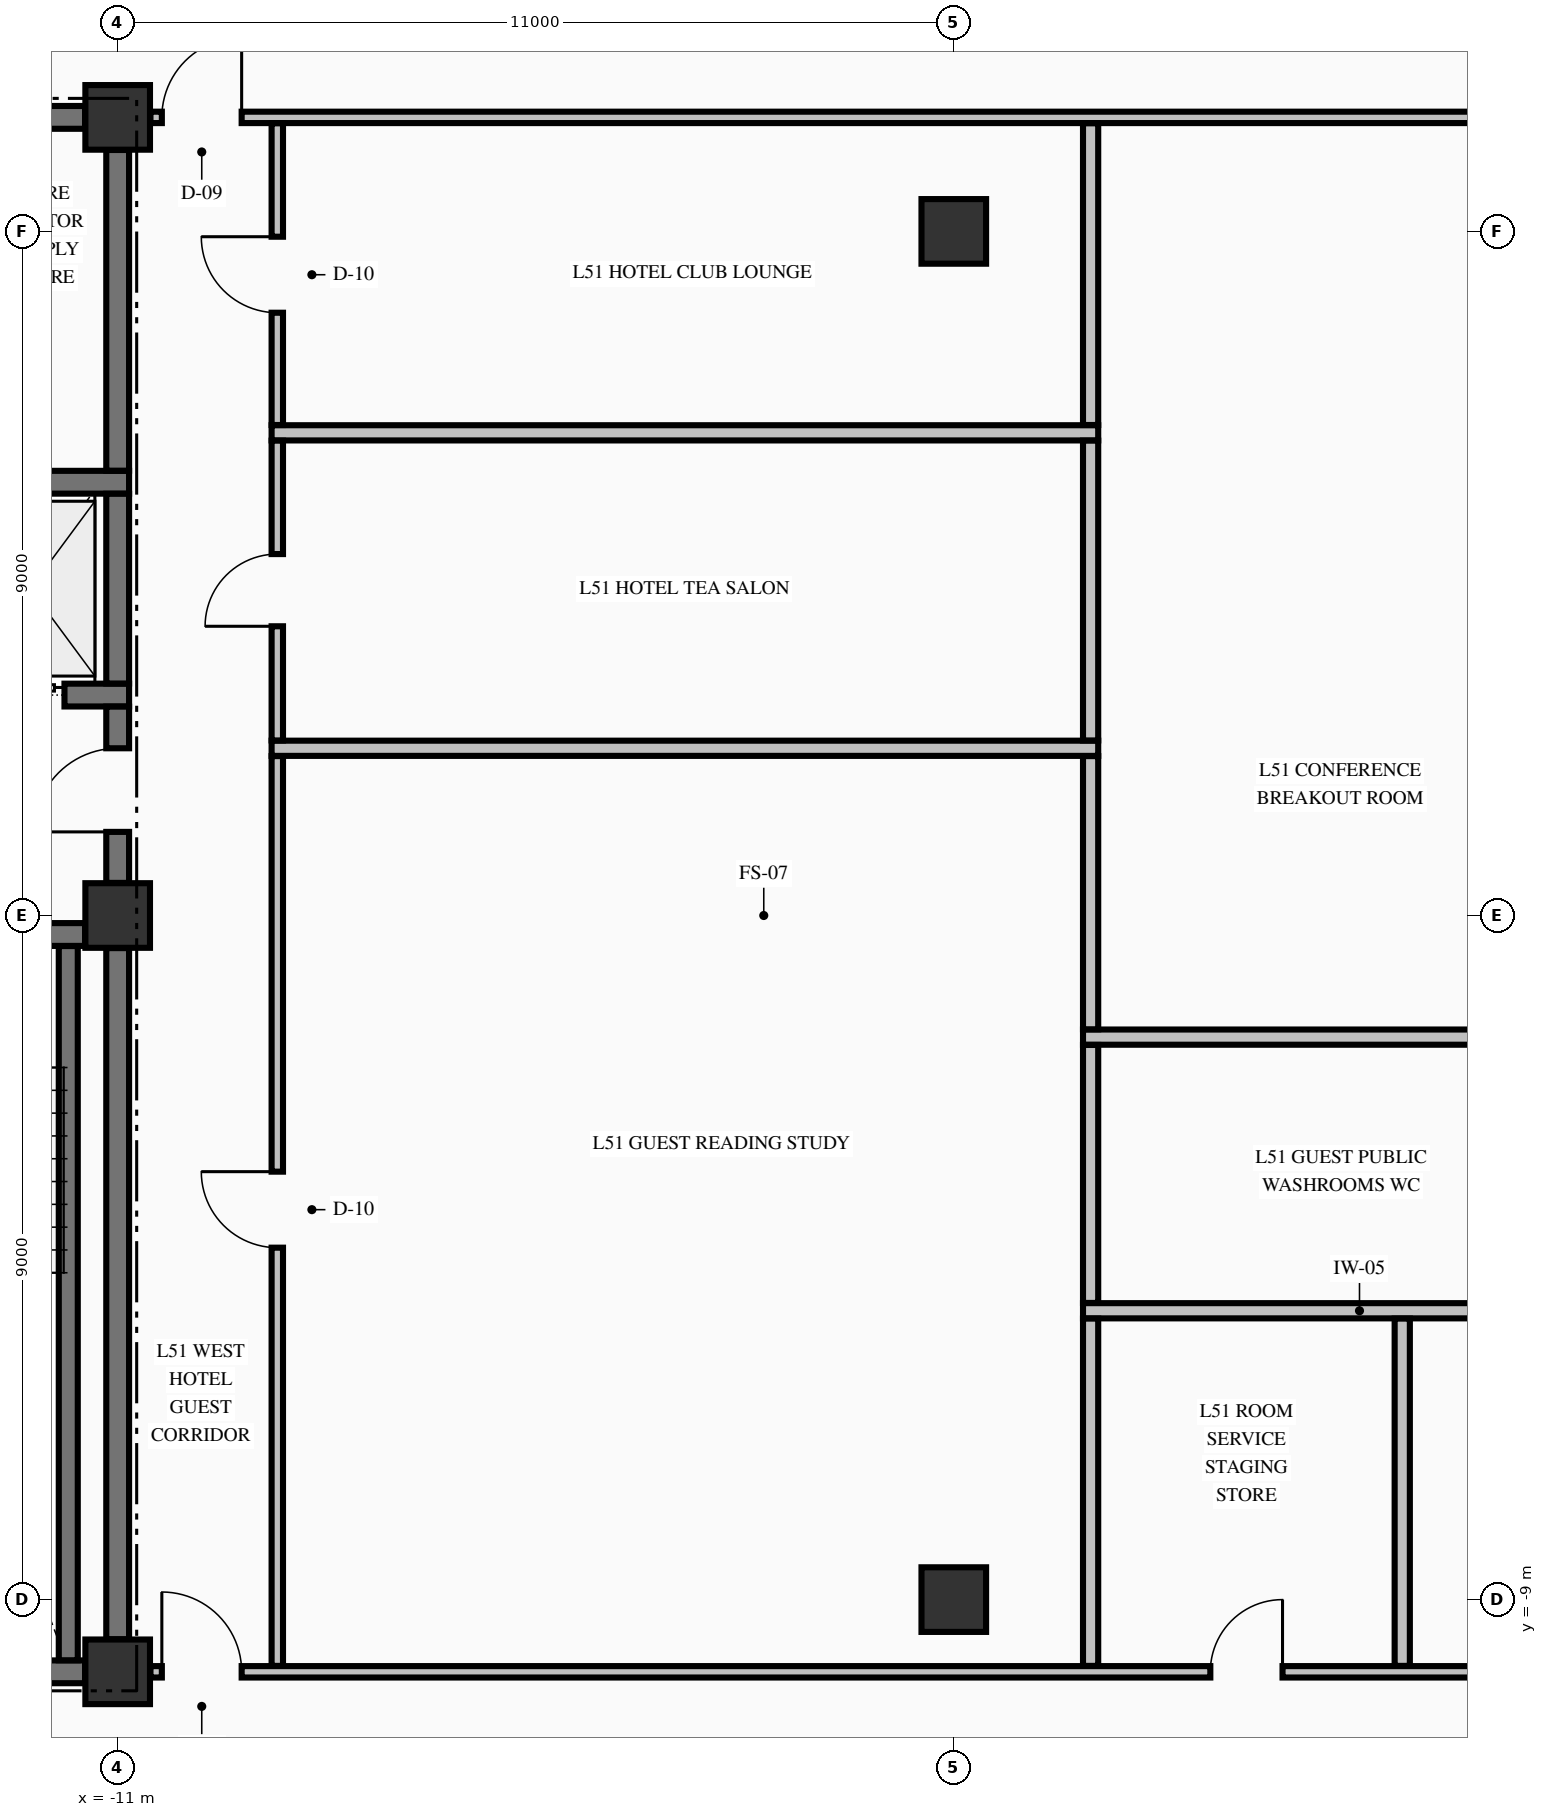
"""IFC4 building model, lengths in metres.
Left out: names, types, materials, properties, quantities, classifications, styles, units other than length and angle.
Written with IfcOpenShell. Run it as: python <this file> out.ifc"""

import sys

from ifc_helpers import new_model, si_unit, direction, frame, frame_2d, origin, origin_2d, place, context, subcontext, project, spatial, rectangle, extrude, element, fill, save


model = new_model("IFC4")
c1 = context("Model", 3, precision=1e-05, world=origin(), true_north=direction((0.0, 1.0)))
c2 = subcontext(c1, "Body", "Model", "MODEL_VIEW")
j1 = project(units=[si_unit("LENGTHUNIT", "METRE"), si_unit("PLANEANGLEUNIT", "RADIAN")], contexts=[c1])
p1 = place(None, origin())
s1 = spatial("IfcSite", under=j1, at=p1, CompositionType="ELEMENT")
p2 = place(p1, origin())
s2 = spatial("IfcBuilding", under=s1, at=p2, CompositionType="ELEMENT")
p3 = place(p2, frame((0.0, 0.0, 198.26)))
s3 = spatial("IfcBuildingStorey", under=s2, at=p3, CompositionType="ELEMENT", Elevation=198.26)
for number, where, z_axis, x_axis in (
    (1, (-11.0, -9.95, -0.25), (0.0, 0.0, 1.0), (1.0, 0.0, 0.0)),
    (2, (-11.0, 0.0, -0.25), (0.0, 0.0, 1.0), (1.0, 0.0, 0.0)),
    (3, (-11.0, 10.5, -0.25), (0.0, 0.0, 1.0), (1.0, 0.0, 0.0)),
    (4, (0.0, -9.0, -0.25), (0.0, 0.0, 1.0), (1.0, 0.0, 0.0)),
    (5, (0.0, 9.0, -0.25), (0.0, 0.0, 1.0), (1.0, 0.0, 0.0)),
):
    element("IfcColumn", number, at=place(p3, frame(where, z_axis=z_axis, x_axis=x_axis)), inside=s3, PredefinedType="COLUMN", context=c2, shape_type="SweptSolid", body=[
        extrude(rectangle(XDim=0.85, YDim=0.85, at=origin_2d()), origin(), (0.0, 0.0, 1.0), 3.4),
    ])
p4 = place(p3, frame((-14.7, -9.95, 0.0), z_axis=(0.0, 0.0, 1.0), x_axis=(1.0, 0.0, 0.0)))
e6 = element("IfcWall", 6, at=p4, inside=s3, PredefinedType="SHEAR", context=c2, shape_type="SweptSolid", body=[
    extrude(rectangle(XDim=3.271, YDim=0.3, at=frame_2d((1.635, 0.0))), origin(), (0.0, 0.0, 1.0), 3.15),
])
p5 = place(p3, frame((-19.571, -0.25, 0.0), z_axis=(0.0, 0.0, 1.0), x_axis=(1.0, 0.0, 0.0)))
e7 = element("IfcWall", 7, at=p5, inside=s3, PredefinedType="SHEAR", context=c2, shape_type="SweptSolid", body=[
    extrude(rectangle(XDim=8.142, YDim=0.3, at=frame_2d((4.071, 0.0))), origin(), (0.0, 0.0, 1.0), 3.15),
])
p6 = place(p5, frame((5.871, 0.0, 0.0)))
e8 = element("IfcOpeningElement", 8, at=p6, cuts=e7, PredefinedType="OPENING", context=c2, shape_type="SweptSolid", body=[
    extrude(rectangle(XDim=1.1, YDim=2.15, at=frame_2d((0.55, 1.075))), frame((0.0, 0.16, 0.0), z_axis=(0.0, -1.0, 0.0), x_axis=(1.0, 0.0, 0.0)), (0.0, 0.0, 1.0), 0.32),
])
p7 = place(p3, frame((-14.875, 2.9, 0.0), z_axis=(0.0, 0.0, 1.0), x_axis=(1.0, 0.0, 0.0)))
e9 = element("IfcWall", 9, at=p7, inside=s3, PredefinedType="SHEAR", context=c2, shape_type="SweptSolid", body=[
    extrude(rectangle(XDim=4.025, YDim=0.3, at=frame_2d((2.012, 0.0))), origin(), (0.0, 0.0, 1.0), 3.15),
])
p8 = place(p7, frame((2.075, 0.0, 0.0)))
e10 = element("IfcOpeningElement", 10, at=p8, cuts=e9, PredefinedType="OPENING", context=c2, shape_type="SweptSolid", body=[
    extrude(rectangle(XDim=1.1, YDim=2.2, at=frame_2d((0.55, 1.1))), frame((0.0, 0.16, 0.0), z_axis=(0.0, -1.0, 0.0), x_axis=(1.0, 0.0, 0.0)), (0.0, 0.0, 1.0), 0.32),
])
p9 = place(p3, frame((-14.875, 5.7, 0.0), z_axis=(0.0, 0.0, 1.0), x_axis=(1.0, 0.0, 0.0)))
e11 = element("IfcWall", 11, at=p9, inside=s3, PredefinedType="SHEAR", context=c2, shape_type="SweptSolid", body=[
    extrude(rectangle(XDim=4.025, YDim=0.3, at=frame_2d((2.012, 0.0))), origin(), (0.0, 0.0, 1.0), 3.15),
])
p10 = place(p3, frame((-14.7, 10.5, 0.0), z_axis=(0.0, 0.0, 1.0), x_axis=(1.0, 0.0, 0.0)))
e12 = element("IfcWall", 12, at=p10, inside=s3, PredefinedType="SHEAR", context=c2, shape_type="SweptSolid", body=[
    extrude(rectangle(XDim=3.271, YDim=0.3, at=frame_2d((1.635, 0.0))), origin(), (0.0, 0.0, 1.0), 3.15),
])
p11 = place(p10, frame((0.245, 0.0, 0.0)))
e13 = element("IfcOpeningElement", 13, at=p11, cuts=e12, PredefinedType="OPENING", context=c2, shape_type="SweptSolid", body=[
    extrude(rectangle(XDim=0.95, YDim=2.15, at=frame_2d((0.475, 1.075))), frame((0.0, 0.16, 0.0), z_axis=(0.0, -1.0, 0.0), x_axis=(1.0, 0.0, 0.0)), (0.0, 0.0, 1.0), 0.32),
])
p12 = place(p3, frame((-10.569, -9.95, 0.0), z_axis=(0.0, 0.0, 1.0), x_axis=(1.0, 0.0, 0.0)))
e14 = element("IfcWall", 14, at=p12, inside=s3, PredefinedType="PARTITIONING", context=c2, shape_type="SweptSolid", body=[
    extrude(rectangle(XDim=21.138, YDim=0.15, at=frame_2d((10.569, 0.0))), origin(), (0.0, 0.0, 1.0), 3.15),
])
p13 = place(p12, frame((0.15, 0.0, 0.0)))
e15 = element("IfcOpeningElement", 15, at=p13, cuts=e14, PredefinedType="OPENING", context=c2, shape_type="SweptSolid", body=[
    extrude(rectangle(XDim=1.05, YDim=2.15, at=frame_2d((0.525, 1.075))), frame((0.0, 0.085, 0.0), z_axis=(0.0, -1.0, 0.0), x_axis=(1.0, 0.0, 0.0)), (0.0, 0.0, 1.0), 0.17),
])
p14 = place(p12, frame((19.938, 0.0, 0.0)))
e16 = element("IfcOpeningElement", 16, at=p14, cuts=e14, PredefinedType="OPENING", context=c2, shape_type="SweptSolid", body=[
    extrude(rectangle(XDim=1.05, YDim=2.15, at=frame_2d((0.525, 1.075))), frame((0.0, 0.085, 0.0), z_axis=(0.0, -1.0, 0.0), x_axis=(1.0, 0.0, 0.0)), (0.0, 0.0, 1.0), 0.17),
])
p15 = place(p12, frame((13.944, 0.0, 0.0)))
e17 = element("IfcOpeningElement", 17, at=p15, cuts=e14, PredefinedType="OPENING", context=c2, shape_type="SweptSolid", body=[
    extrude(rectangle(XDim=0.95, YDim=2.15, at=frame_2d((0.475, 1.075))), frame((0.0, 0.085, 0.0), z_axis=(0.0, -1.0, 0.0), x_axis=(1.0, 0.0, 0.0)), (0.0, 0.0, 1.0), 0.17),
])
for number, where, z_axis, x_axis in (
    (18, (1.7, -5.2, 0.0), (0.0, 0.0, 1.0), (1.0, 0.0, 0.0)),
    (19, (1.7, -1.6, 0.0), (0.0, 0.0, 1.0), (1.0, 0.0, 0.0)),
):
    element("IfcWall", number, at=place(p3, frame(where, z_axis=z_axis, x_axis=x_axis)), inside=s3, PredefinedType="PARTITIONING", context=c2, shape_type="SweptSolid", body=[
        extrude(rectangle(XDim=7.275, YDim=0.2, at=frame_2d((3.638, 0.0))), origin(), (0.0, 0.0, 1.0), 3.15),
    ])
for number, where, z_axis, x_axis in (
    (20, (-8.975, 2.2, 0.0), (0.0, 0.0, 1.0), (1.0, 0.0, 0.0)),
    (21, (-8.975, 6.35, 0.0), (0.0, 0.0, 1.0), (1.0, 0.0, 0.0)),
):
    element("IfcWall", number, at=place(p3, frame(where, z_axis=z_axis, x_axis=x_axis)), inside=s3, PredefinedType="PARTITIONING", context=c2, shape_type="SweptSolid", body=[
        extrude(rectangle(XDim=10.875, YDim=0.2, at=frame_2d((5.438, 0.0))), origin(), (0.0, 0.0, 1.0), 3.15),
    ])
p16 = place(p3, frame((-10.569, 10.5, 0.0), z_axis=(0.0, 0.0, 1.0), x_axis=(1.0, 0.0, 0.0)))
e22 = element("IfcWall", 22, at=p16, inside=s3, PredefinedType="PARTITIONING", context=c2, shape_type="SweptSolid", body=[
    extrude(rectangle(XDim=21.138, YDim=0.15, at=frame_2d((10.569, 0.0))), origin(), (0.0, 0.0, 1.0), 3.15),
])
p17 = place(p16, frame((0.15, 0.0, 0.0)))
e23 = element("IfcOpeningElement", 23, at=p17, cuts=e22, PredefinedType="OPENING", context=c2, shape_type="SweptSolid", body=[
    extrude(rectangle(XDim=1.05, YDim=2.15, at=frame_2d((0.525, 1.075))), frame((0.0, 0.085, 0.0), z_axis=(0.0, -1.0, 0.0), x_axis=(1.0, 0.0, 0.0)), (0.0, 0.0, 1.0), 0.17),
])
p18 = place(p16, frame((19.938, 0.0, 0.0)))
e24 = element("IfcOpeningElement", 24, at=p18, cuts=e22, PredefinedType="OPENING", context=c2, shape_type="SweptSolid", body=[
    extrude(rectangle(XDim=1.05, YDim=2.15, at=frame_2d((0.525, 1.075))), frame((0.0, 0.085, 0.0), z_axis=(0.0, -1.0, 0.0), x_axis=(1.0, 0.0, 0.0)), (0.0, 0.0, 1.0), 0.17),
])
p19 = place(p3, frame((-11.65, -9.798, 0.0), z_axis=(0.0, 0.0, 1.0), x_axis=(0.0, 1.0, 0.0)))
e25 = element("IfcWall", 25, at=p19, inside=s3, PredefinedType="SOLIDWALL", context=c2, shape_type="SweptSolid", body=[
    extrude(rectangle(XDim=9.396, YDim=0.25, at=frame_2d((4.698, 0.0))), origin(), (0.0, 0.0, 1.0), 3.15),
])
p20 = place(p3, frame((-11.0, -9.521, 0.0), z_axis=(0.0, 0.0, 1.0), x_axis=(0.0, 1.0, 0.0)))
e26 = element("IfcWall", 26, at=p20, inside=s3, PredefinedType="SHEAR", context=c2, shape_type="SweptSolid", body=[
    extrude(rectangle(XDim=9.092, YDim=0.3, at=frame_2d((4.546, 0.0))), origin(), (0.0, 0.0, 1.0), 3.15),
])
p21 = place(p3, frame((-11.0, 0.429, 0.0), z_axis=(0.0, 0.0, 1.0), x_axis=(0.0, 1.0, 0.0)))
e27 = element("IfcWall", 27, at=p21, inside=s3, PredefinedType="SHEAR", context=c2, shape_type="SweptSolid", body=[
    extrude(rectangle(XDim=2.319, YDim=0.3, at=frame_2d((1.16, 0.0))), origin(), (0.0, 0.0, 1.0), 3.15),
])
p22 = place(p21, frame((0.671, 0.0, 0.0)))
e28 = element("IfcOpeningElement", 28, at=p22, cuts=e27, PredefinedType="OPENING", context=c2, shape_type="SweptSolid", body=[
    extrude(rectangle(XDim=1.1, YDim=2.15, at=frame_2d((0.55, 1.075))), frame((0.0, 0.16, 0.0), z_axis=(0.0, -1.0, 0.0), x_axis=(1.0, 0.0, 0.0)), (0.0, 0.0, 1.0), 0.32),
])
p23 = place(p3, frame((-11.0, 3.052, 0.0), z_axis=(0.0, 0.0, 1.0), x_axis=(0.0, 1.0, 0.0)))
e29 = element("IfcWall", 29, at=p23, inside=s3, PredefinedType="SHEAR", context=c2, shape_type="SweptSolid", body=[
    extrude(rectangle(XDim=2.496, YDim=0.3, at=frame_2d((1.248, 0.0))), origin(), (0.0, 0.0, 1.0), 3.15),
])
p24 = place(p3, frame((-11.0, 5.852, 0.0), z_axis=(0.0, 0.0, 1.0), x_axis=(0.0, 1.0, 0.0)))
e30 = element("IfcWall", 30, at=p24, inside=s3, PredefinedType="SHEAR", context=c2, shape_type="SweptSolid", body=[
    extrude(rectangle(XDim=4.219, YDim=0.3, at=frame_2d((2.109, 0.0))), origin(), (0.0, 0.0, 1.0), 3.15),
])
p25 = place(p3, frame((-8.9, -9.872, 0.0), z_axis=(0.0, 0.0, 1.0), x_axis=(0.0, 1.0, 0.0)))
e31 = element("IfcWall", 31, at=p25, inside=s3, PredefinedType="PARTITIONING", context=c2, shape_type="SweptSolid", body=[
    extrude(rectangle(XDim=11.969, YDim=0.15, at=frame_2d((5.984, 0.0))), origin(), (0.0, 0.0, 1.0), 3.15),
])
p26 = place(p25, frame((5.502, 0.0, 0.0)))
e32 = element("IfcOpeningElement", 32, at=p26, cuts=e31, PredefinedType="OPENING", context=c2, shape_type="SweptSolid", body=[
    extrude(rectangle(XDim=1.0, YDim=2.15, at=frame_2d((0.5, 1.075))), frame((0.0, 0.085, 0.0), z_axis=(0.0, -1.0, 0.0), x_axis=(1.0, 0.0, 0.0)), (0.0, 0.0, 1.0), 0.17),
])
p27 = place(p3, frame((-8.9, 2.303, 0.0), z_axis=(0.0, 0.0, 1.0), x_axis=(0.0, 1.0, 0.0)))
e33 = element("IfcWall", 33, at=p27, inside=s3, PredefinedType="PARTITIONING", context=c2, shape_type="SweptSolid", body=[
    extrude(rectangle(XDim=3.944, YDim=0.15, at=frame_2d((1.972, 0.0))), origin(), (0.0, 0.0, 1.0), 3.15),
])
p28 = place(p27, frame((1.502, 0.0, 0.0)))
e34 = element("IfcOpeningElement", 34, at=p28, cuts=e33, PredefinedType="OPENING", context=c2, shape_type="SweptSolid", body=[
    extrude(rectangle(XDim=0.95, YDim=2.15, at=frame_2d((0.475, 1.075))), frame((0.0, 0.085, 0.0), z_axis=(0.0, -1.0, 0.0), x_axis=(1.0, 0.0, 0.0)), (0.0, 0.0, 1.0), 0.17),
])
p29 = place(p3, frame((-8.9, 6.453, 0.0), z_axis=(0.0, 0.0, 1.0), x_axis=(0.0, 1.0, 0.0)))
e35 = element("IfcWall", 35, at=p29, inside=s3, PredefinedType="PARTITIONING", context=c2, shape_type="SweptSolid", body=[
    extrude(rectangle(XDim=3.969, YDim=0.15, at=frame_2d((1.985, 0.0))), origin(), (0.0, 0.0, 1.0), 3.15),
])
p30 = place(p29, frame((1.477, 0.0, 0.0)))
e36 = element("IfcOpeningElement", 36, at=p30, cuts=e35, PredefinedType="OPENING", context=c2, shape_type="SweptSolid", body=[
    extrude(rectangle(XDim=1.0, YDim=2.15, at=frame_2d((0.5, 1.075))), frame((0.0, 0.085, 0.0), z_axis=(0.0, -1.0, 0.0), x_axis=(1.0, 0.0, 0.0)), (0.0, 0.0, 1.0), 0.17),
])
p31 = place(p3, frame((1.8, -9.872, 0.0), z_axis=(0.0, 0.0, 1.0), x_axis=(0.0, 1.0, 0.0)))
e37 = element("IfcWall", 37, at=p31, inside=s3, PredefinedType="PARTITIONING", context=c2, shape_type="SweptSolid", body=[
    extrude(rectangle(XDim=4.569, YDim=0.2, at=frame_2d((2.285, 0.0))), origin(), (0.0, 0.0, 1.0), 3.15),
])
p32 = place(p3, frame((1.8, -5.097, 0.0), z_axis=(0.0, 0.0, 1.0), x_axis=(0.0, 1.0, 0.0)))
e38 = element("IfcWall", 38, at=p32, inside=s3, PredefinedType="PARTITIONING", context=c2, shape_type="SweptSolid", body=[
    extrude(rectangle(XDim=3.394, YDim=0.2, at=frame_2d((1.697, 0.0))), origin(), (0.0, 0.0, 1.0), 3.15),
])
p33 = place(p3, frame((1.8, -1.497, 0.0), z_axis=(0.0, 0.0, 1.0), x_axis=(0.0, 1.0, 0.0)))
e39 = element("IfcWall", 39, at=p33, inside=s3, PredefinedType="PARTITIONING", context=c2, shape_type="SweptSolid", body=[
    extrude(rectangle(XDim=3.594, YDim=0.2, at=frame_2d((1.797, 0.0))), origin(), (0.0, 0.0, 1.0), 3.15),
])
p34 = place(p3, frame((1.8, 2.303, 0.0), z_axis=(0.0, 0.0, 1.0), x_axis=(0.0, 1.0, 0.0)))
e40 = element("IfcWall", 40, at=p34, inside=s3, PredefinedType="PARTITIONING", context=c2, shape_type="SweptSolid", body=[
    extrude(rectangle(XDim=3.944, YDim=0.2, at=frame_2d((1.972, 0.0))), origin(), (0.0, 0.0, 1.0), 3.15),
])
p35 = place(p3, frame((1.8, 6.453, 0.0), z_axis=(0.0, 0.0, 1.0), x_axis=(0.0, 1.0, 0.0)))
e41 = element("IfcWall", 41, at=p35, inside=s3, PredefinedType="PARTITIONING", context=c2, shape_type="SweptSolid", body=[
    extrude(rectangle(XDim=3.969, YDim=0.2, at=frame_2d((1.985, 0.0))), origin(), (0.0, 0.0, 1.0), 3.15),
])
p36 = place(p3, frame((5.9, -9.872, 0.0), z_axis=(0.0, 0.0, 1.0), x_axis=(0.0, 1.0, 0.0)))
e42 = element("IfcWall", 42, at=p36, inside=s3, PredefinedType="PARTITIONING", context=c2, shape_type="SweptSolid", body=[
    extrude(rectangle(XDim=4.569, YDim=0.2, at=frame_2d((2.285, 0.0))), origin(), (0.0, 0.0, 1.0), 3.15),
])
p37 = place(p22, origin())
e43 = element("IfcDoor", 43, at=p37, inside=s3, OperationType="SINGLE_SWING_LEFT", PredefinedType="DOOR", context=c2, shape_type="SweptSolid", body=[
    extrude(rectangle(XDim=1.1, YDim=2.15, at=frame_2d((0.55, 1.075))), frame((0.0, 0.025, 0.0), z_axis=(0.0, -1.0, 0.0), x_axis=(1.0, 0.0, 0.0)), (0.0, 0.0, 1.0), 0.05),
])
fill(e28, e43)
p38 = place(p8, origin())
e44 = element("IfcDoor", 44, at=p38, inside=s3, OperationType="SLIDING_TO_LEFT", PredefinedType="DOOR", context=c2, shape_type="SweptSolid", body=[
    extrude(rectangle(XDim=1.1, YDim=2.2, at=frame_2d((0.55, 1.1))), frame((0.0, 0.025, 0.0), z_axis=(0.0, -1.0, 0.0), x_axis=(1.0, 0.0, 0.0)), (0.0, 0.0, 1.0), 0.05),
])
fill(e10, e44)
p39 = place(p17, origin())
e45 = element("IfcDoor", 45, at=p39, inside=s3, OperationType="SINGLE_SWING_RIGHT", PredefinedType="DOOR", context=c2, shape_type="SweptSolid", body=[
    extrude(rectangle(XDim=1.05, YDim=2.15, at=frame_2d((0.525, 1.075))), frame((0.0, 0.025, 0.0), z_axis=(0.0, -1.0, 0.0), x_axis=(1.0, 0.0, 0.0)), (0.0, 0.0, 1.0), 0.05),
])
fill(e23, e45)
p40 = place(p13, origin())
e46 = element("IfcDoor", 46, at=p40, inside=s3, OperationType="SINGLE_SWING_LEFT", PredefinedType="DOOR", context=c2, shape_type="SweptSolid", body=[
    extrude(rectangle(XDim=1.05, YDim=2.15, at=frame_2d((0.525, 1.075))), frame((0.0, 0.025, 0.0), z_axis=(0.0, -1.0, 0.0), x_axis=(1.0, 0.0, 0.0)), (0.0, 0.0, 1.0), 0.05),
])
fill(e15, e46)
p41 = place(p30, origin())
e47 = element("IfcDoor", 47, at=p41, inside=s3, OperationType="SINGLE_SWING_RIGHT", PredefinedType="DOOR", context=c2, shape_type="SweptSolid", body=[
    extrude(rectangle(XDim=1.0, YDim=2.15, at=frame_2d((0.5, 1.075))), frame((0.0, 0.025, 0.0), z_axis=(0.0, -1.0, 0.0), x_axis=(1.0, 0.0, 0.0)), (0.0, 0.0, 1.0), 0.05),
])
fill(e36, e47)
p42 = place(p28, origin())
e48 = element("IfcDoor", 48, at=p42, inside=s3, OperationType="SINGLE_SWING_LEFT", PredefinedType="DOOR", context=c2, shape_type="SweptSolid", body=[
    extrude(rectangle(XDim=0.95, YDim=2.15, at=frame_2d((0.475, 1.075))), frame((0.0, 0.025, 0.0), z_axis=(0.0, -1.0, 0.0), x_axis=(1.0, 0.0, 0.0)), (0.0, 0.0, 1.0), 0.05),
])
fill(e34, e48)
p43 = place(p26, origin())
e49 = element("IfcDoor", 49, at=p43, inside=s3, OperationType="SINGLE_SWING_RIGHT", PredefinedType="DOOR", context=c2, shape_type="SweptSolid", body=[
    extrude(rectangle(XDim=1.0, YDim=2.15, at=frame_2d((0.5, 1.075))), frame((0.0, 0.025, 0.0), z_axis=(0.0, -1.0, 0.0), x_axis=(1.0, 0.0, 0.0)), (0.0, 0.0, 1.0), 0.05),
])
fill(e32, e49)
p44 = place(p15, origin())
e50 = element("IfcDoor", 50, at=p44, inside=s3, OperationType="SINGLE_SWING_RIGHT", PredefinedType="DOOR", context=c2, shape_type="SweptSolid", body=[
    extrude(rectangle(XDim=0.95, YDim=2.15, at=frame_2d((0.475, 1.075))), frame((0.0, 0.025, 0.0), z_axis=(0.0, -1.0, 0.0), x_axis=(1.0, 0.0, 0.0)), (0.0, 0.0, 1.0), 0.05),
])
fill(e17, e50)
save(model, sys.argv[1])
